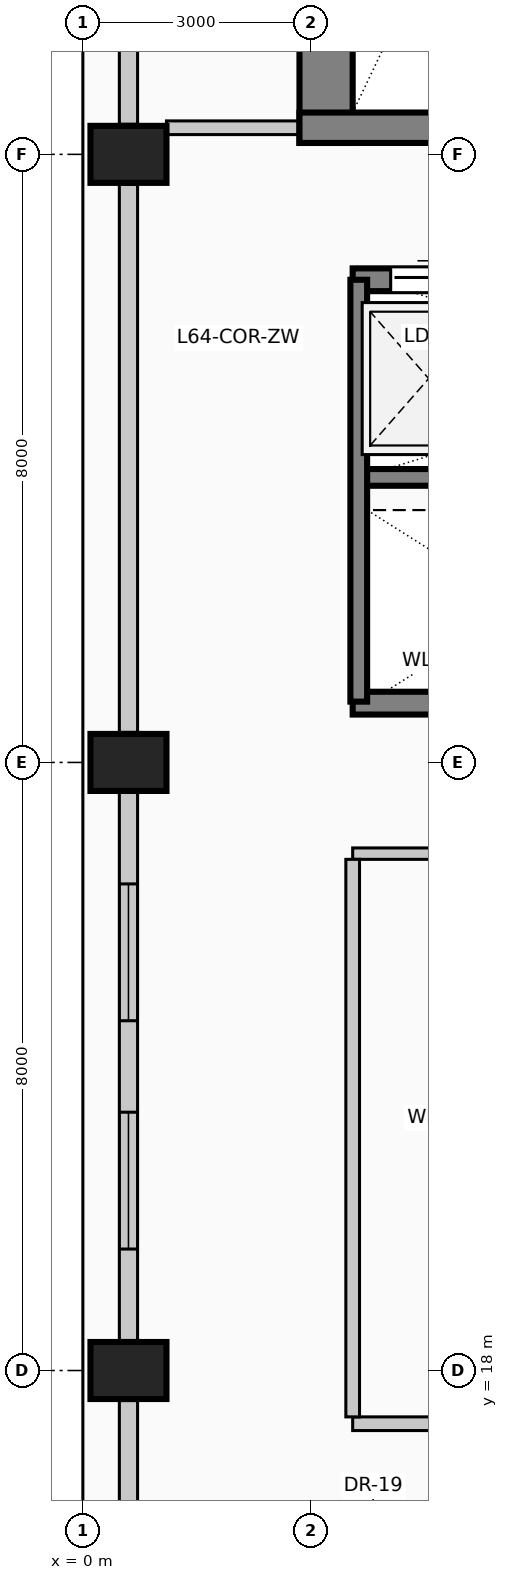
"""IFC4 building model, lengths in metres.
Left out: names, types, materials, properties, quantities, classifications, styles, units other than length and angle.
Written with IfcOpenShell. Run it as: python <this file> out.ifc"""

import sys

from ifc_helpers import new_model, si_unit, direction, frame, frame_2d, origin, origin_2d, place, context, subcontext, project, spatial, rectangle, extrude, element, fill, save


model = new_model("IFC4")
c1 = context("Model", 3, precision=1e-05, world=origin(), true_north=direction((0.0, 1.0)))
c2 = subcontext(c1, "Body", "Model", "MODEL_VIEW")
j1 = project(units=[si_unit("LENGTHUNIT", "METRE"), si_unit("PLANEANGLEUNIT", "RADIAN")], contexts=[c1])
p1 = place(None, origin())
s1 = spatial("IfcSite", under=j1, at=p1, CompositionType="ELEMENT")
p2 = place(p1, origin())
s2 = spatial("IfcBuilding", under=s1, at=p2, CompositionType="ELEMENT")
p3 = place(p2, frame((0.0, 0.0, 264.6)))
s3 = spatial("IfcBuildingStorey", under=s2, at=p3, CompositionType="ELEMENT", Elevation=264.6)
p4 = place(p3, frame((3.2, 34.15, 0.0), z_axis=(0.0, 0.0, 1.0), x_axis=(0.0, 1.0, 0.0)))
e1 = element("IfcWall", 1, at=p4, inside=s3, PredefinedType="SHEAR", context=c2, shape_type="SweptSolid", body=[
    extrude(rectangle(XDim=8.98, YDim=0.7, at=frame_2d((4.49, 0.0))), origin(), (0.0, 0.0, 1.0), 4.0),
])
p5 = place(p3, frame((2.85, 34.35, 0.0), z_axis=(0.0, 0.0, 1.0), x_axis=(1.0, 0.0, 0.0)))
e2 = element("IfcWall", 2, at=p5, inside=s3, PredefinedType="SHEAR", context=c2, shape_type="SweptSolid", body=[
    extrude(rectangle(XDim=4.86, YDim=0.4, at=frame_2d((2.43, 0.0))), origin(), (0.0, 0.0, 1.0), 4.0),
])
p6 = place(p5, frame((2.4, 0.0, 0.0)))
e3 = element("IfcOpeningElement", 3, at=p6, cuts=e2, PredefinedType="OPENING", context=c2, shape_type="SweptSolid", body=[
    extrude(rectangle(XDim=1.15, YDim=2.2, at=frame_2d((0.575, 1.1))), frame((0.0, 0.21, 0.0), z_axis=(0.0, -1.0, 0.0), x_axis=(1.0, 0.0, 0.0)), (0.0, 0.0, 1.0), 0.42),
])
for number, where, z_axis, x_axis in (
    (4, (0.6, 18.0, 0.0), (0.0, 0.0, 1.0), (0.0, 1.0, 0.0)),
    (5, (0.6, 26.0, 0.0), (0.0, 0.0, 1.0), (0.0, 1.0, 0.0)),
    (6, (0.6, 34.0, 0.0), (0.0, 0.0, 1.0), (0.0, 1.0, 0.0)),
):
    element("IfcColumn", number, at=place(p3, frame(where, z_axis=z_axis, x_axis=x_axis)), inside=s3, PredefinedType="COLUMN", context=c2, shape_type="SweptSolid", body=[
        extrude(rectangle(XDim=0.75, YDim=1.0, at=origin_2d()), origin(), (0.0, 0.0, 1.0), 4.0),
    ])
p7 = place(p3, frame((0.6, 10.395, 0.0), z_axis=(0.0, 0.0, 1.0), x_axis=(0.0, 1.0, 0.0)))
e7 = element("IfcWall", 7, at=p7, inside=s3, PredefinedType="SOLIDWALL", context=c2, shape_type="SweptSolid", body=[
    extrude(rectangle(XDim=7.21, YDim=0.24, at=frame_2d((3.605, 0.0))), origin(), (0.0, 0.0, 1.0), 3.0),
])
p8 = place(p7, frame((1.203, 0.0, 0.42)))
e8 = element("IfcOpeningElement", 8, at=p8, cuts=e7, PredefinedType="OPENING", context=c2, shape_type="SweptSolid", body=[
    extrude(rectangle(XDim=1.8, YDim=2.2, at=frame_2d((0.9, 1.1))), frame((0.0, 0.13, 0.0), z_axis=(0.0, -1.0, 0.0), x_axis=(1.0, 0.0, 0.0)), (0.0, 0.0, 1.0), 0.26),
])
p9 = place(p3, frame((0.6, 18.395, 0.0), z_axis=(0.0, 0.0, 1.0), x_axis=(0.0, 1.0, 0.0)))
e9 = element("IfcWall", 9, at=p9, inside=s3, PredefinedType="SOLIDWALL", context=c2, shape_type="SweptSolid", body=[
    extrude(rectangle(XDim=7.21, YDim=0.24, at=frame_2d((3.605, 0.0))), origin(), (0.0, 0.0, 1.0), 3.0),
])
p10 = place(p9, frame((1.203, 0.0, 0.42)))
e10 = element("IfcOpeningElement", 10, at=p10, cuts=e9, PredefinedType="OPENING", context=c2, shape_type="SweptSolid", body=[
    extrude(rectangle(XDim=1.8, YDim=2.2, at=frame_2d((0.9, 1.1))), frame((0.0, 0.13, 0.0), z_axis=(0.0, -1.0, 0.0), x_axis=(1.0, 0.0, 0.0)), (0.0, 0.0, 1.0), 0.26),
])
p11 = place(p9, frame((4.207, 0.0, 0.42)))
e11 = element("IfcOpeningElement", 11, at=p11, cuts=e9, PredefinedType="OPENING", context=c2, shape_type="SweptSolid", body=[
    extrude(rectangle(XDim=1.8, YDim=2.2, at=frame_2d((0.9, 1.1))), frame((0.0, 0.13, 0.0), z_axis=(0.0, -1.0, 0.0), x_axis=(1.0, 0.0, 0.0)), (0.0, 0.0, 1.0), 0.26),
])
p12 = place(p3, frame((0.6, 26.395, 0.0), z_axis=(0.0, 0.0, 1.0), x_axis=(0.0, 1.0, 0.0)))
e12 = element("IfcWall", 12, at=p12, inside=s3, PredefinedType="SOLIDWALL", context=c2, shape_type="SweptSolid", body=[
    extrude(rectangle(XDim=7.21, YDim=0.24, at=frame_2d((3.605, 0.0))), origin(), (0.0, 0.0, 1.0), 3.0),
])
p13 = place(p3, frame((0.6, 34.395, 0.0), z_axis=(0.0, 0.0, 1.0), x_axis=(0.0, 1.0, 0.0)))
e13 = element("IfcWall", 13, at=p13, inside=s3, PredefinedType="SOLIDWALL", context=c2, shape_type="SweptSolid", body=[
    extrude(rectangle(XDim=7.61, YDim=0.24, at=frame_2d((3.805, 0.0))), origin(), (0.0, 0.0, 1.0), 3.0),
])
p14 = place(p3, frame((3.55, 32.35, 0.0), z_axis=(0.0, 0.0, 1.0), x_axis=(1.0, 0.0, 0.0)))
e14 = element("IfcWall", 14, at=p14, inside=s3, PredefinedType="SOLIDWALL", context=c2, shape_type="SweptSolid", body=[
    extrude(rectangle(XDim=2.1, YDim=0.3, at=frame_2d((1.05, 0.0))), origin(), (0.0, 0.0, 1.0), 4.0),
])
p15 = place(p14, frame((0.5, 0.0, 0.0)))
e15 = element("IfcOpeningElement", 15, at=p15, cuts=e14, PredefinedType="OPENING", context=c2, shape_type="SweptSolid", body=[
    extrude(rectangle(XDim=1.1, YDim=2.2, at=frame_2d((0.55, 1.1))), frame((0.0, 0.16, 0.0), z_axis=(0.0, -1.0, 0.0), x_axis=(1.0, 0.0, 0.0)), (0.0, 0.0, 1.0), 0.32),
])
p16 = place(p3, frame((5.65, 26.78, 0.0), z_axis=(0.0, 0.0, 1.0), x_axis=(-1.0, 0.0, 0.0)))
e16 = element("IfcWall", 16, at=p16, inside=s3, PredefinedType="SOLIDWALL", context=c2, shape_type="SweptSolid", body=[
    extrude(rectangle(XDim=2.1, YDim=0.3, at=frame_2d((1.05, 0.0))), origin(), (0.0, 0.0, 1.0), 4.0),
])
p17 = place(p3, frame((3.55, 29.75, 0.0), z_axis=(0.0, 0.0, 1.0), x_axis=(1.0, 0.0, 0.0)))
e17 = element("IfcWall", 17, at=p17, inside=s3, PredefinedType="SOLIDWALL", context=c2, shape_type="SweptSolid", body=[
    extrude(rectangle(XDim=8.65, YDim=0.22, at=frame_2d((4.325, 0.0))), origin(), (0.0, 0.0, 1.0), 4.0),
])
p18 = place(p3, frame((3.63, 26.8, 0.0), z_axis=(0.0, 0.0, 1.0), x_axis=(0.0, 1.0, 0.0)))
e18 = element("IfcWall", 18, at=p18, inside=s3, PredefinedType="SOLIDWALL", context=c2, shape_type="SweptSolid", body=[
    extrude(rectangle(XDim=5.55, YDim=0.22, at=frame_2d((2.775, 0.0))), origin(), (0.0, 0.0, 1.0), 4.0),
])
p19 = place(p3, frame((3.55, 17.3, 0.0), z_axis=(0.0, 0.0, 1.0), x_axis=(1.0, 0.0, 0.0)))
e19 = element("IfcWall", 19, at=p19, inside=s3, PredefinedType="PARTITIONING", context=c2, shape_type="SweptSolid", body=[
    extrude(rectangle(XDim=6.25, YDim=0.18, at=frame_2d((3.125, 0.0))), origin(), (0.0, 0.0, 1.0), 3.75),
])
p20 = place(p19, frame((2.6, 0.0, 0.0)))
e20 = element("IfcOpeningElement", 20, at=p20, cuts=e19, PredefinedType="OPENING", context=c2, shape_type="SweptSolid", body=[
    extrude(rectangle(XDim=1.05, YDim=2.15, at=frame_2d((0.525, 1.075))), frame((0.0, 0.1, 0.0), z_axis=(0.0, -1.0, 0.0), x_axis=(1.0, 0.0, 0.0)), (0.0, 0.0, 1.0), 0.2),
])
p21 = place(p3, frame((3.55, 24.8, 0.0), z_axis=(0.0, 0.0, 1.0), x_axis=(1.0, 0.0, 0.0)))
e21 = element("IfcWall", 21, at=p21, inside=s3, PredefinedType="PARTITIONING", context=c2, shape_type="SweptSolid", body=[
    extrude(rectangle(XDim=6.25, YDim=0.15, at=frame_2d((3.125, 0.0))), origin(), (0.0, 0.0, 1.0), 3.75),
])
p22 = place(p3, frame((1.1, 34.35, 0.0), z_axis=(0.0, 0.0, 1.0), x_axis=(1.0, 0.0, 0.0)))
e22 = element("IfcWall", 22, at=p22, inside=s3, PredefinedType="PARTITIONING", context=c2, shape_type="SweptSolid", body=[
    extrude(rectangle(XDim=1.75, YDim=0.18, at=frame_2d((0.875, 0.0))), origin(), (0.0, 0.0, 1.0), 3.75),
])
p23 = place(p3, frame((3.55, 17.39, 0.0), z_axis=(0.0, 0.0, 1.0), x_axis=(0.0, 1.0, 0.0)))
e23 = element("IfcWall", 23, at=p23, inside=s3, PredefinedType="PARTITIONING", context=c2, shape_type="SweptSolid", body=[
    extrude(rectangle(XDim=7.335, YDim=0.18, at=frame_2d((3.667, 0.0))), origin(), (0.0, 0.0, 1.0), 3.75),
])
p24 = place(p10, origin())
e24 = element("IfcWindow", 24, at=p24, inside=s3, PartitioningType="SINGLE_PANEL", PredefinedType="WINDOW", context=c2, shape_type="SweptSolid", body=[
    extrude(rectangle(XDim=1.8, YDim=2.2, at=frame_2d((0.9, 1.1))), frame((0.0, 0.03, 0.0), z_axis=(0.0, -1.0, 0.0), x_axis=(1.0, 0.0, 0.0)), (0.0, 0.0, 1.0), 0.06),
])
fill(e10, e24)
p25 = place(p11, origin())
e25 = element("IfcWindow", 25, at=p25, inside=s3, PartitioningType="SINGLE_PANEL", PredefinedType="WINDOW", context=c2, shape_type="SweptSolid", body=[
    extrude(rectangle(XDim=1.8, YDim=2.2, at=frame_2d((0.9, 1.1))), frame((0.0, 0.03, 0.0), z_axis=(0.0, -1.0, 0.0), x_axis=(1.0, 0.0, 0.0)), (0.0, 0.0, 1.0), 0.06),
])
fill(e11, e25)
p26 = place(p15, origin())
e26 = element("IfcDoor", 26, at=p26, inside=s3, OperationType="SLIDING_TO_LEFT", PredefinedType="DOOR", context=c2, shape_type="SweptSolid", body=[
    extrude(rectangle(XDim=1.1, YDim=2.2, at=frame_2d((0.55, 1.1))), frame((0.0, 0.025, 0.0), z_axis=(0.0, -1.0, 0.0), x_axis=(1.0, 0.0, 0.0)), (0.0, 0.0, 1.0), 0.05),
])
fill(e15, e26)
save(model, sys.argv[1])
